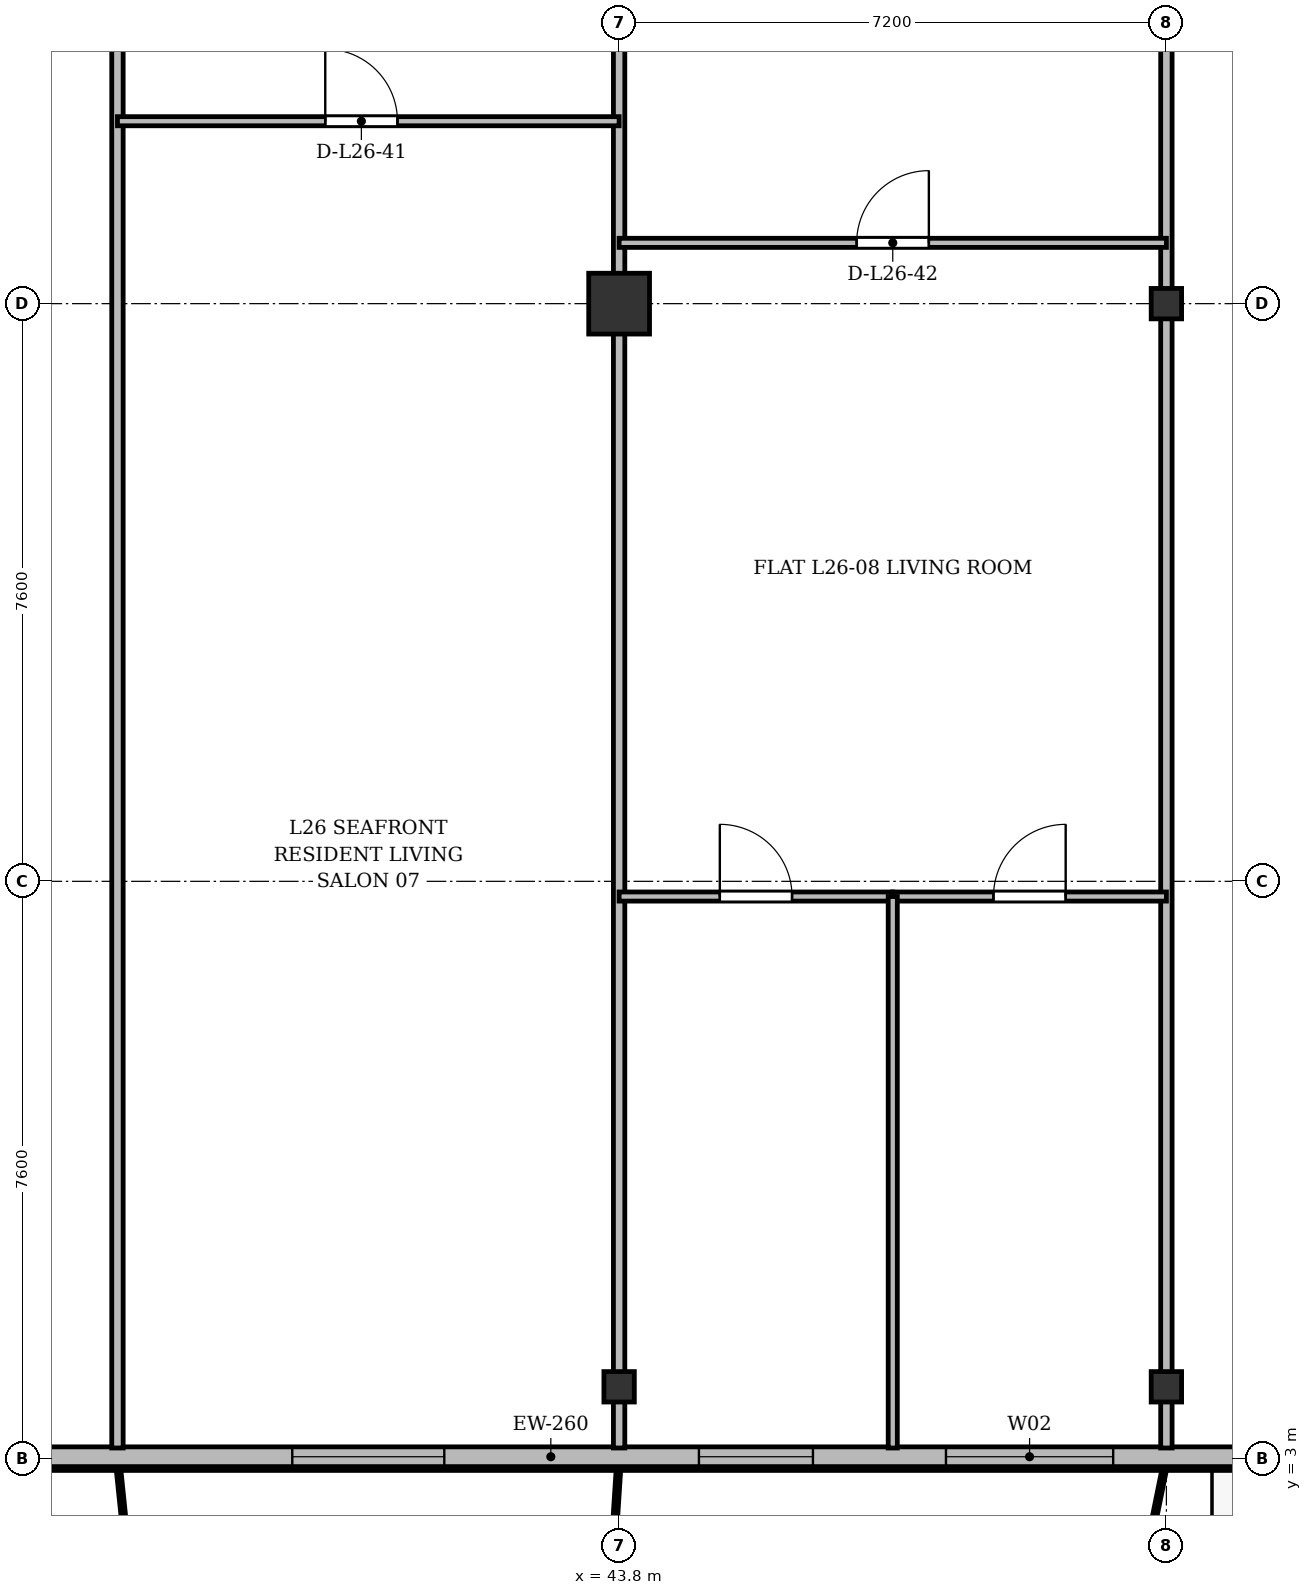
"""IFC4 building model, lengths in metres.
Left out: names, types, materials, properties, quantities, classifications, styles, units other than length and angle.
Written with IfcOpenShell. Run it as: python <this file> out.ifc"""

import sys

from ifc_helpers import new_model, si_unit, direction, frame, frame_2d, origin, origin_2d, place, context, subcontext, project, spatial, rectangle, i_section, extrude, source, transform, mapped, element, fill, save


model = new_model("IFC4")
c1 = context("Model", 3, precision=1e-05, world=origin(), true_north=direction((0.0, 1.0)))
c2 = subcontext(c1, "Body", "Model", "MODEL_VIEW")
j1 = project(units=[si_unit("LENGTHUNIT", "METRE"), si_unit("PLANEANGLEUNIT", "RADIAN")], contexts=[c1])
p1 = place(None, origin())
s1 = spatial("IfcSite", under=j1, at=p1, CompositionType="ELEMENT")
p2 = place(p1, origin())
s2 = spatial("IfcBuilding", under=s1, at=p2, CompositionType="ELEMENT")
p3 = place(p2, frame((0.0, 0.0, 103.3)))
s3 = spatial("IfcBuildingStorey", under=s2, at=p3, CompositionType="ELEMENT", Elevation=103.3)
m1 = source(origin(), c2, "Body", "SweptSolid", [
    extrude(i_section(OverallWidth=0.4, OverallDepth=0.4, WebThickness=0.022, FlangeThickness=0.035, at=origin_2d()), origin(), (0.0, 0.0, 1.0), 3.6),
])
p4 = place(p3, frame((43.8, 3.95, 0.0), z_axis=(0.0, 0.0, 1.0), x_axis=(1.0, 0.0, 0.0)))
e1 = element("IfcColumn", 1, at=p4, inside=s3, PredefinedType="COLUMN", context=c2, shape_type="MappedRepresentation", body=[
    mapped(m1, transform((0.0, 0.0, 0.0), x_axis=(1.0, 0.0, 0.0), y_axis=(0.0, 1.0, 0.0), z_axis=(0.0, 0.0, 1.0), scale=1.0)),
])
m2 = source(origin(), c2, "Body", "SweptSolid", [
    extrude(rectangle(XDim=0.8, YDim=0.8, at=origin_2d()), origin(), (0.0, 0.0, 1.0), 3.6),
])
p5 = place(p3, frame((43.8, 18.2, 0.0), z_axis=(0.0, 0.0, 1.0), x_axis=(1.0, 0.0, 0.0)))
e2 = element("IfcColumn", 2, at=p5, inside=s3, PredefinedType="COLUMN", context=c2, shape_type="MappedRepresentation", body=[
    mapped(m2, transform((0.0, 0.0, 0.0), x_axis=(1.0, 0.0, 0.0), y_axis=(0.0, 1.0, 0.0), z_axis=(0.0, 0.0, 1.0), scale=1.0)),
])
for number, where, z_axis, x_axis in (
    (3, (51.0, 3.95, 0.0), (0.0, 0.0, 1.0), (1.0, 0.0, 0.0)),
    (4, (51.0, 18.2, 0.0), (0.0, 0.0, 1.0), (1.0, 0.0, 0.0)),
):
    element("IfcColumn", number, at=place(p3, frame(where, z_axis=z_axis, x_axis=x_axis)), inside=s3, PredefinedType="COLUMN", context=c2, shape_type="MappedRepresentation", body=[
        mapped(m1, transform((0.0, 0.0, 0.0), x_axis=(1.0, 0.0, 0.0), y_axis=(0.0, 1.0, 0.0), z_axis=(0.0, 0.0, 1.0), scale=1.0)),
    ])
p6 = place(p3, frame((66.9, 3.03, 0.0), z_axis=(0.0, 0.0, 1.0), x_axis=(-1.0, 0.0, 0.0)))
e5 = element("IfcWall", 5, at=p6, inside=s3, PredefinedType="SOLIDWALL", context=c2, shape_type="SweptSolid", body=[
    extrude(rectangle(XDim=59.4, YDim=0.26, at=frame_2d((29.7, 0.0))), origin(), (0.0, 0.0, 1.0), 3.34),
])
p7 = place(p6, frame((2.25, 0.0, 0.9)))
e6 = element("IfcOpeningElement", 6, at=p7, cuts=e5, PredefinedType="OPENING", context=c2, shape_type="SweptSolid", body=[
    extrude(rectangle(XDim=1.5, YDim=1.75, at=frame_2d((0.75, 0.875))), frame((0.0, 0.14, 0.0), z_axis=(0.0, -1.0, 0.0), x_axis=(1.0, 0.0, 0.0)), (0.0, 0.0, 1.0), 0.28),
])
p8 = place(p6, frame((5.4, 0.0, 0.9)))
e7 = element("IfcOpeningElement", 7, at=p8, cuts=e5, PredefinedType="OPENING", context=c2, shape_type="SweptSolid", body=[
    extrude(rectangle(XDim=2.0, YDim=1.95, at=frame_2d((1.0, 0.975))), frame((0.0, 0.14, 0.0), z_axis=(0.0, -1.0, 0.0), x_axis=(1.0, 0.0, 0.0)), (0.0, 0.0, 1.0), 0.28),
])
p9 = place(p6, frame((9.213, 0.0, 0.0)))
e8 = element("IfcOpeningElement", 8, at=p9, cuts=e5, PredefinedType="OPENING", context=c2, shape_type="SweptSolid", body=[
    extrude(rectangle(XDim=1.2, YDim=2.2, at=frame_2d((0.6, 1.1))), frame((0.0, 0.14, 0.0), z_axis=(0.0, -1.0, 0.0), x_axis=(1.0, 0.0, 0.0)), (0.0, 0.0, 1.0), 0.28),
])
p10 = place(p6, frame((13.0, 0.0, 0.9)))
e9 = element("IfcOpeningElement", 9, at=p10, cuts=e5, PredefinedType="OPENING", context=c2, shape_type="SweptSolid", body=[
    extrude(rectangle(XDim=1.8, YDim=1.8, at=frame_2d((0.9, 0.9))), frame((0.0, 0.14, 0.0), z_axis=(0.0, -1.0, 0.0), x_axis=(1.0, 0.0, 0.0)), (0.0, 0.0, 1.0), 0.28),
])
p11 = place(p6, frame((16.6, 0.0, 0.9)))
e10 = element("IfcOpeningElement", 10, at=p11, cuts=e5, PredefinedType="OPENING", context=c2, shape_type="SweptSolid", body=[
    extrude(rectangle(XDim=2.2, YDim=1.8, at=frame_2d((1.1, 0.9))), frame((0.0, 0.14, 0.0), z_axis=(0.0, -1.0, 0.0), x_axis=(1.0, 0.0, 0.0)), (0.0, 0.0, 1.0), 0.28),
])
p12 = place(p6, frame((20.55, 0.0, 0.9)))
e11 = element("IfcOpeningElement", 11, at=p12, cuts=e5, PredefinedType="OPENING", context=c2, shape_type="SweptSolid", body=[
    extrude(rectangle(XDim=1.5, YDim=1.75, at=frame_2d((0.75, 0.875))), frame((0.0, 0.14, 0.0), z_axis=(0.0, -1.0, 0.0), x_axis=(1.0, 0.0, 0.0)), (0.0, 0.0, 1.0), 0.28),
])
p13 = place(p6, frame((25.4, 0.0, 0.9)))
e12 = element("IfcOpeningElement", 12, at=p13, cuts=e5, PredefinedType="OPENING", context=c2, shape_type="SweptSolid", body=[
    extrude(rectangle(XDim=2.0, YDim=1.95, at=frame_2d((1.0, 0.975))), frame((0.0, 0.14, 0.0), z_axis=(0.0, -1.0, 0.0), x_axis=(1.0, 0.0, 0.0)), (0.0, 0.0, 1.0), 0.28),
])
p14 = place(p6, frame((32.175, 0.0, 0.9)))
e13 = element("IfcOpeningElement", 13, at=p14, cuts=e5, PredefinedType="OPENING", context=c2, shape_type="SweptSolid", body=[
    extrude(rectangle(XDim=1.65, YDim=1.85, at=frame_2d((0.825, 0.925))), frame((0.0, 0.14, 0.0), z_axis=(0.0, -1.0, 0.0), x_axis=(1.0, 0.0, 0.0)), (0.0, 0.0, 1.0), 0.28),
])
p15 = place(p6, frame((37.584, 0.0, 0.0)))
e14 = element("IfcOpeningElement", 14, at=p15, cuts=e5, PredefinedType="OPENING", context=c2, shape_type="SweptSolid", body=[
    extrude(rectangle(XDim=1.2, YDim=2.2, at=frame_2d((0.6, 1.1))), frame((0.0, 0.14, 0.0), z_axis=(0.0, -1.0, 0.0), x_axis=(1.0, 0.0, 0.0)), (0.0, 0.0, 1.0), 0.28),
])
p16 = place(p6, frame((40.5, 0.0, 0.9)))
e15 = element("IfcOpeningElement", 15, at=p16, cuts=e5, PredefinedType="OPENING", context=c2, shape_type="SweptSolid", body=[
    extrude(rectangle(XDim=2.2, YDim=1.8, at=frame_2d((1.1, 0.9))), frame((0.0, 0.14, 0.0), z_axis=(0.0, -1.0, 0.0), x_axis=(1.0, 0.0, 0.0)), (0.0, 0.0, 1.0), 0.28),
])
p17 = place(p6, frame((46.65, 0.0, 0.9)))
e16 = element("IfcOpeningElement", 16, at=p17, cuts=e5, PredefinedType="OPENING", context=c2, shape_type="SweptSolid", body=[
    extrude(rectangle(XDim=1.5, YDim=1.75, at=frame_2d((0.75, 0.875))), frame((0.0, 0.14, 0.0), z_axis=(0.0, -1.0, 0.0), x_axis=(1.0, 0.0, 0.0)), (0.0, 0.0, 1.0), 0.28),
])
p18 = place(p6, frame((55.817, 0.0, 0.0)))
e17 = element("IfcOpeningElement", 17, at=p18, cuts=e5, PredefinedType="OPENING", context=c2, shape_type="SweptSolid", body=[
    extrude(rectangle(XDim=1.2, YDim=2.2, at=frame_2d((0.6, 1.1))), frame((0.0, 0.14, 0.0), z_axis=(0.0, -1.0, 0.0), x_axis=(1.0, 0.0, 0.0)), (0.0, 0.0, 1.0), 0.28),
])
p19 = place(p3, frame((37.2, 3.145, 0.0), z_axis=(0.0, 0.0, 1.0), x_axis=(0.0, 1.0, 0.0)))
e18 = element("IfcWall", 18, at=p19, inside=s3, PredefinedType="PARTITIONING", context=c2, shape_type="SweptSolid", body=[
    extrude(rectangle(XDim=24.455, YDim=0.15, at=frame_2d((12.228, 0.0))), origin(), (0.0, 0.0, 1.0), 2.752),
])
for number, where, z_axis, x_axis in (
    (19, (43.8, 3.145, 0.0), (0.0, 0.0, 1.0), (0.0, 1.0, 0.0)),
    (20, (51.0, 3.145, 0.0), (0.0, 0.0, 1.0), (0.0, 1.0, 0.0)),
):
    element("IfcWall", number, at=place(p3, frame(where, z_axis=z_axis, x_axis=x_axis)), inside=s3, PredefinedType="PARTITIONING", context=c2, shape_type="SweptSolid", body=[
        extrude(rectangle(XDim=24.455, YDim=0.15, at=frame_2d((12.228, 0.0))), origin(), (0.0, 0.0, 1.0), 2.84),
    ])
p20 = place(p3, frame((37.2, 20.6, 0.0), z_axis=(0.0, 0.0, 1.0), x_axis=(1.0, 0.0, 0.0)))
e21 = element("IfcWall", 21, at=p20, inside=s3, PredefinedType="PARTITIONING", context=c2, shape_type="SweptSolid", body=[
    extrude(rectangle(XDim=6.6, YDim=0.12, at=frame_2d((3.3, 0.0))), origin(), (0.0, 0.0, 1.0), 2.84),
])
p21 = place(p20, frame((2.734, 0.0, 0.0)))
e22 = element("IfcOpeningElement", 22, at=p21, cuts=e21, PredefinedType="OPENING", context=c2, shape_type="SweptSolid", body=[
    extrude(rectangle(XDim=0.95, YDim=2.15, at=frame_2d((0.475, 1.075))), frame((0.0, 0.07, 0.0), z_axis=(0.0, -1.0, 0.0), x_axis=(1.0, 0.0, 0.0)), (0.0, 0.0, 1.0), 0.14),
])
p22 = place(p3, frame((43.8, 19.0, 0.0), z_axis=(0.0, 0.0, 1.0), x_axis=(1.0, 0.0, 0.0)))
e23 = element("IfcWall", 23, at=p22, inside=s3, PredefinedType="PARTITIONING", context=c2, shape_type="SweptSolid", body=[
    extrude(rectangle(XDim=7.2, YDim=0.12, at=frame_2d((3.6, 0.0))), origin(), (0.0, 0.0, 1.0), 2.84),
])
p23 = place(p22, frame((3.125, 0.0, 0.0)))
e24 = element("IfcOpeningElement", 24, at=p23, cuts=e23, PredefinedType="OPENING", context=c2, shape_type="SweptSolid", body=[
    extrude(rectangle(XDim=0.95, YDim=2.15, at=frame_2d((0.475, 1.075))), frame((0.0, 0.07, 0.0), z_axis=(0.0, -1.0, 0.0), x_axis=(1.0, 0.0, 0.0)), (0.0, 0.0, 1.0), 0.14),
])
p24 = place(p3, frame((43.8, 10.4, 0.0), z_axis=(0.0, 0.0, 1.0), x_axis=(1.0, 0.0, 0.0)))
e25 = element("IfcWall", 25, at=p24, inside=s3, PredefinedType="PARTITIONING", context=c2, shape_type="SweptSolid", body=[
    extrude(rectangle(XDim=3.6, YDim=0.12, at=frame_2d((1.8, 0.0))), origin(), (0.0, 0.0, 1.0), 2.84),
])
p25 = place(p24, frame((1.325, 0.0, 0.0)))
e26 = element("IfcOpeningElement", 26, at=p25, cuts=e25, PredefinedType="OPENING", context=c2, shape_type="SweptSolid", body=[
    extrude(rectangle(XDim=0.95, YDim=2.15, at=frame_2d((0.475, 1.075))), frame((0.0, 0.07, 0.0), z_axis=(0.0, -1.0, 0.0), x_axis=(1.0, 0.0, 0.0)), (0.0, 0.0, 1.0), 0.14),
])
p26 = place(p3, frame((47.4, 10.4, 0.0), z_axis=(0.0, 0.0, 1.0), x_axis=(1.0, 0.0, 0.0)))
e27 = element("IfcWall", 27, at=p26, inside=s3, PredefinedType="PARTITIONING", context=c2, shape_type="SweptSolid", body=[
    extrude(rectangle(XDim=3.6, YDim=0.12, at=frame_2d((1.8, 0.0))), origin(), (0.0, 0.0, 1.0), 2.84),
])
p27 = place(p26, frame((1.325, 0.0, 0.0)))
e28 = element("IfcOpeningElement", 28, at=p27, cuts=e27, PredefinedType="OPENING", context=c2, shape_type="SweptSolid", body=[
    extrude(rectangle(XDim=0.95, YDim=2.15, at=frame_2d((0.475, 1.075))), frame((0.0, 0.07, 0.0), z_axis=(0.0, -1.0, 0.0), x_axis=(1.0, 0.0, 0.0)), (0.0, 0.0, 1.0), 0.14),
])
p28 = place(p3, frame((47.4, 3.145, 0.0), z_axis=(0.0, 0.0, 1.0), x_axis=(0.0, 1.0, 0.0)))
e29 = element("IfcWall", 29, at=p28, inside=s3, PredefinedType="PARTITIONING", context=c2, shape_type="SweptSolid", body=[
    extrude(rectangle(XDim=7.255, YDim=0.12, at=frame_2d((3.627, 0.0))), origin(), (0.0, 0.0, 1.0), 2.752),
])
m3 = source(origin(), c2, "Body", "SweptSolid", [
    extrude(rectangle(XDim=2.2, YDim=1.8, at=frame_2d((1.1, 0.9))), frame((0.0, 0.03, 0.0), z_axis=(0.0, -1.0, 0.0), x_axis=(1.0, 0.0, 0.0)), (0.0, 0.0, 1.0), 0.06),
])
p29 = place(p11, origin())
e30 = element("IfcWindow", 30, at=p29, inside=s3, PartitioningType="SINGLE_PANEL", PredefinedType="WINDOW", context=c2, shape_type="MappedRepresentation", body=[
    mapped(m3, transform((0.0, 0.0, 0.0), x_axis=(1.0, 0.0, 0.0), y_axis=(0.0, 1.0, 0.0), z_axis=(0.0, 0.0, 1.0), scale=1.0)),
])
fill(e10, e30)
m4 = source(origin(), c2, "Body", "SweptSolid", [
    extrude(rectangle(XDim=1.5, YDim=1.75, at=frame_2d((0.75, 0.875))), frame((0.0, 0.03, 0.0), z_axis=(0.0, -1.0, 0.0), x_axis=(1.0, 0.0, 0.0)), (0.0, 0.0, 1.0), 0.06),
])
p30 = place(p12, origin())
e31 = element("IfcWindow", 31, at=p30, inside=s3, PartitioningType="SINGLE_PANEL", PredefinedType="WINDOW", context=c2, shape_type="MappedRepresentation", body=[
    mapped(m4, transform((0.0, 0.0, 0.0), x_axis=(1.0, 0.0, 0.0), y_axis=(0.0, 1.0, 0.0), z_axis=(0.0, 0.0, 1.0), scale=1.0)),
])
fill(e11, e31)
m5 = source(origin(), c2, "Body", "SweptSolid", [
    extrude(rectangle(XDim=2.0, YDim=1.95, at=frame_2d((1.0, 0.975))), frame((0.0, 0.03, 0.0), z_axis=(0.0, -1.0, 0.0), x_axis=(1.0, 0.0, 0.0)), (0.0, 0.0, 1.0), 0.06),
])
p31 = place(p13, origin())
e32 = element("IfcWindow", 32, at=p31, inside=s3, PartitioningType="SINGLE_PANEL", PredefinedType="WINDOW", context=c2, shape_type="MappedRepresentation", body=[
    mapped(m5, transform((0.0, 0.0, 0.0), x_axis=(1.0, 0.0, 0.0), y_axis=(0.0, 1.0, 0.0), z_axis=(0.0, 0.0, 1.0), scale=1.0)),
])
fill(e12, e32)
m6 = source(origin(), c2, "Body", "SweptSolid", [
    extrude(rectangle(XDim=0.95, YDim=2.15, at=frame_2d((0.475, 1.075))), frame((0.0, 0.025, 0.0), z_axis=(0.0, -1.0, 0.0), x_axis=(1.0, 0.0, 0.0)), (0.0, 0.0, 1.0), 0.05),
])
p32 = place(p21, origin())
e33 = element("IfcDoor", 33, at=p32, inside=s3, OperationType="SINGLE_SWING_LEFT", PredefinedType="DOOR", context=c2, shape_type="MappedRepresentation", body=[
    mapped(m6, transform((0.0, 0.0, 0.0), x_axis=(1.0, 0.0, 0.0), y_axis=(0.0, 1.0, 0.0), z_axis=(0.0, 0.0, 1.0), scale=1.0)),
])
fill(e22, e33)
p33 = place(p23, origin())
e34 = element("IfcDoor", 34, at=p33, inside=s3, OperationType="SINGLE_SWING_RIGHT", PredefinedType="DOOR", context=c2, shape_type="MappedRepresentation", body=[
    mapped(m6, transform((0.0, 0.0, 0.0), x_axis=(1.0, 0.0, 0.0), y_axis=(0.0, 1.0, 0.0), z_axis=(0.0, 0.0, 1.0), scale=1.0)),
])
fill(e24, e34)
p34 = place(p25, origin())
e35 = element("IfcDoor", 35, at=p34, inside=s3, OperationType="SINGLE_SWING_LEFT", PredefinedType="DOOR", context=c2, shape_type="MappedRepresentation", body=[
    mapped(m6, transform((0.0, 0.0, 0.0), x_axis=(1.0, 0.0, 0.0), y_axis=(0.0, 1.0, 0.0), z_axis=(0.0, 0.0, 1.0), scale=1.0)),
])
fill(e26, e35)
p35 = place(p27, origin())
e36 = element("IfcDoor", 36, at=p35, inside=s3, OperationType="SINGLE_SWING_RIGHT", PredefinedType="DOOR", context=c2, shape_type="MappedRepresentation", body=[
    mapped(m6, transform((0.0, 0.0, 0.0), x_axis=(1.0, 0.0, 0.0), y_axis=(0.0, 1.0, 0.0), z_axis=(0.0, 0.0, 1.0), scale=1.0)),
])
fill(e28, e36)
save(model, sys.argv[1])
